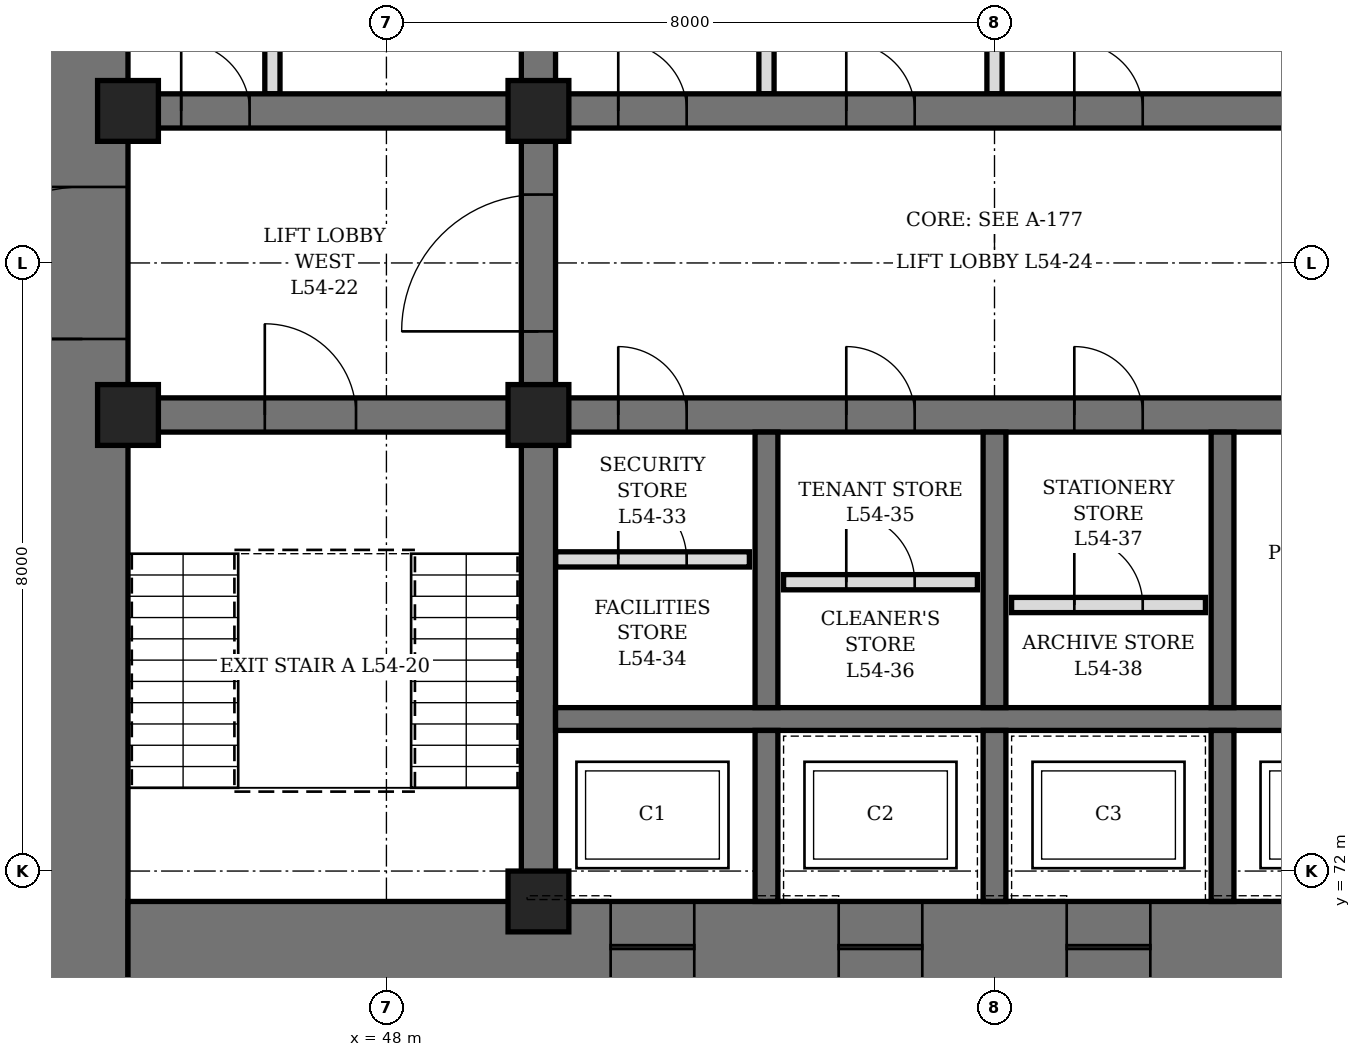
"""IFC4 building model, lengths in metres.
Left out: names, types, materials, properties, quantities, classifications, styles, units other than length and angle.
Written with IfcOpenShell. Run it as: python <this file> out.ifc"""

import sys

from ifc_helpers import new_model, si_unit, direction, frame, frame_2d, origin, origin_2d, place, context, subcontext, project, spatial, rectangle, hollow_rectangle, extrude, element, fill, save


model = new_model("IFC4")
c1 = context("Model", 3, precision=1e-05, world=origin(), true_north=direction((0.0, 1.0)))
c2 = subcontext(c1, "Body", "Model", "MODEL_VIEW")
j1 = project(units=[si_unit("LENGTHUNIT", "METRE"), si_unit("PLANEANGLEUNIT", "RADIAN")], contexts=[c1])
p1 = place(None, origin())
s1 = spatial("IfcSite", under=j1, at=p1, CompositionType="ELEMENT")
p2 = place(p1, origin())
s2 = spatial("IfcBuilding", under=s1, at=p2, CompositionType="ELEMENT")
p3 = place(p2, frame((0.0, 0.0, 240.1)))
s3 = spatial("IfcBuildingStorey", under=s2, at=p3, CompositionType="ELEMENT", Elevation=240.1)
p4 = place(p3, frame((44.0, 70.4, 0.0), z_axis=(0.0, 0.0, 1.0), x_axis=(0.0, 1.0, 0.0)))
e1 = element("IfcWall", 1, at=p4, inside=s3, PredefinedType="SHEAR", context=c2, shape_type="SweptSolid", body=[
    extrude(rectangle(XDim=19.2, YDim=1.2, at=frame_2d((9.6, 0.0))), origin(), (0.0, 0.0, 1.0), 4.2),
])
p5 = place(p4, frame((8.6, 0.0, 0.0)))
e2 = element("IfcOpeningElement", 2, at=p5, cuts=e1, PredefinedType="OPENING", context=c2, shape_type="SweptSolid", body=[
    extrude(rectangle(XDim=2.0, YDim=2.4, at=frame_2d((1.0, 1.2))), frame((0.0, 0.61, 0.0), z_axis=(0.0, -1.0, 0.0), x_axis=(1.0, 0.0, 0.0)), (0.0, 0.0, 1.0), 1.22),
])
p6 = place(p3, frame((44.6, 71.0, 0.0), z_axis=(0.0, 0.0, 1.0), x_axis=(1.0, 0.0, 0.0)))
e3 = element("IfcWall", 3, at=p6, inside=s3, PredefinedType="SHEAR", context=c2, shape_type="SweptSolid", body=[
    extrude(rectangle(XDim=22.8, YDim=1.2, at=frame_2d((11.4, 0.0))), origin(), (0.0, 0.0, 1.0), 4.2),
])
p7 = place(p6, frame((6.35, 0.0, 0.0)))
e4 = element("IfcOpeningElement", 4, at=p7, cuts=e3, PredefinedType="OPENING", context=c2, shape_type="SweptSolid", body=[
    extrude(rectangle(XDim=1.1, YDim=2.2, at=frame_2d((0.55, 1.1))), frame((0.0, 0.61, 0.0), z_axis=(0.0, -1.0, 0.0), x_axis=(1.0, 0.0, 0.0)), (0.0, 0.0, 1.0), 1.22),
])
p8 = place(p6, frame((9.35, 0.0, 0.0)))
e5 = element("IfcOpeningElement", 5, at=p8, cuts=e3, PredefinedType="OPENING", context=c2, shape_type="SweptSolid", body=[
    extrude(rectangle(XDim=1.1, YDim=2.2, at=frame_2d((0.55, 1.1))), frame((0.0, 0.61, 0.0), z_axis=(0.0, -1.0, 0.0), x_axis=(1.0, 0.0, 0.0)), (0.0, 0.0, 1.0), 1.22),
])
p9 = place(p6, frame((12.35, 0.0, 0.0)))
e6 = element("IfcOpeningElement", 6, at=p9, cuts=e3, PredefinedType="OPENING", context=c2, shape_type="SweptSolid", body=[
    extrude(rectangle(XDim=1.1, YDim=2.2, at=frame_2d((0.55, 1.1))), frame((0.0, 0.61, 0.0), z_axis=(0.0, -1.0, 0.0), x_axis=(1.0, 0.0, 0.0)), (0.0, 0.0, 1.0), 1.22),
])
p10 = place(p6, frame((15.35, 0.0, 0.0)))
e7 = element("IfcOpeningElement", 7, at=p10, cuts=e3, PredefinedType="OPENING", context=c2, shape_type="SweptSolid", body=[
    extrude(rectangle(XDim=1.1, YDim=2.2, at=frame_2d((0.55, 1.1))), frame((0.0, 0.61, 0.0), z_axis=(0.0, -1.0, 0.0), x_axis=(1.0, 0.0, 0.0)), (0.0, 0.0, 1.0), 1.22),
])
p11 = place(p3, frame((50.0, 71.6, 0.0), z_axis=(0.0, 0.0, 1.0), x_axis=(0.0, 1.0, 0.0)))
e8 = element("IfcWall", 8, at=p11, inside=s3, PredefinedType="SHEAR", context=c2, shape_type="SweptSolid", body=[
    extrude(rectangle(XDim=16.8, YDim=0.45, at=frame_2d((8.4, 0.0))), origin(), (0.0, 0.0, 1.0), 4.2),
])
p12 = place(p11, frame((7.5, 0.0, 0.0)))
e9 = element("IfcOpeningElement", 9, at=p12, cuts=e8, PredefinedType="OPENING", context=c2, shape_type="SweptSolid", body=[
    extrude(rectangle(XDim=1.8, YDim=2.4, at=frame_2d((0.9, 1.2))), frame((0.0, 0.235, 0.0), z_axis=(0.0, -1.0, 0.0), x_axis=(1.0, 0.0, 0.0)), (0.0, 0.0, 1.0), 0.47),
])
p13 = place(p3, frame((44.6, 78.0, 0.0), z_axis=(0.0, 0.0, 1.0), x_axis=(1.0, 0.0, 0.0)))
e10 = element("IfcWall", 10, at=p13, inside=s3, PredefinedType="SHEAR", context=c2, shape_type="SweptSolid", body=[
    extrude(rectangle(XDim=5.175, YDim=0.45, at=frame_2d((2.587, 0.0))), origin(), (0.0, 0.0, 1.0), 4.2),
])
p14 = place(p13, frame((1.8, 0.0, 0.0)))
e11 = element("IfcOpeningElement", 11, at=p14, cuts=e10, PredefinedType="OPENING", context=c2, shape_type="SweptSolid", body=[
    extrude(rectangle(XDim=1.2, YDim=2.1, at=frame_2d((0.6, 1.05))), frame((0.0, 0.235, 0.0), z_axis=(0.0, -1.0, 0.0), x_axis=(1.0, 0.0, 0.0)), (0.0, 0.0, 1.0), 0.47),
])
p15 = place(p3, frame((44.6, 82.0, 0.0), z_axis=(0.0, 0.0, 1.0), x_axis=(1.0, 0.0, 0.0)))
e12 = element("IfcWall", 12, at=p15, inside=s3, PredefinedType="SHEAR", context=c2, shape_type="SweptSolid", body=[
    extrude(rectangle(XDim=5.175, YDim=0.45, at=frame_2d((2.587, 0.0))), origin(), (0.0, 0.0, 1.0), 4.2),
])
p16 = place(p15, frame((0.7, 0.0, 0.0)))
e13 = element("IfcOpeningElement", 13, at=p16, cuts=e12, PredefinedType="OPENING", context=c2, shape_type="SweptSolid", body=[
    extrude(rectangle(XDim=0.9, YDim=2.1, at=frame_2d((0.45, 1.05))), frame((0.0, 0.235, 0.0), z_axis=(0.0, -1.0, 0.0), x_axis=(1.0, 0.0, 0.0)), (0.0, 0.0, 1.0), 0.47),
])
p17 = place(p3, frame((50.225, 78.0, 0.0), z_axis=(0.0, 0.0, 1.0), x_axis=(1.0, 0.0, 0.0)))
e14 = element("IfcWall", 14, at=p17, inside=s3, PredefinedType="SHEAR", context=c2, shape_type="SweptSolid", body=[
    extrude(rectangle(XDim=11.55, YDim=0.45, at=frame_2d((5.775, 0.0))), origin(), (0.0, 0.0, 1.0), 4.2),
])
p18 = place(p17, frame((0.825, 0.0, 0.0)))
e15 = element("IfcOpeningElement", 15, at=p18, cuts=e14, PredefinedType="OPENING", context=c2, shape_type="SweptSolid", body=[
    extrude(rectangle(XDim=0.9, YDim=2.1, at=frame_2d((0.45, 1.05))), frame((0.0, 0.235, 0.0), z_axis=(0.0, -1.0, 0.0), x_axis=(1.0, 0.0, 0.0)), (0.0, 0.0, 1.0), 0.47),
])
p19 = place(p17, frame((3.825, 0.0, 0.0)))
e16 = element("IfcOpeningElement", 16, at=p19, cuts=e14, PredefinedType="OPENING", context=c2, shape_type="SweptSolid", body=[
    extrude(rectangle(XDim=0.9, YDim=2.1, at=frame_2d((0.45, 1.05))), frame((0.0, 0.235, 0.0), z_axis=(0.0, -1.0, 0.0), x_axis=(1.0, 0.0, 0.0)), (0.0, 0.0, 1.0), 0.47),
])
p20 = place(p17, frame((6.825, 0.0, 0.0)))
e17 = element("IfcOpeningElement", 17, at=p20, cuts=e14, PredefinedType="OPENING", context=c2, shape_type="SweptSolid", body=[
    extrude(rectangle(XDim=0.9, YDim=2.1, at=frame_2d((0.45, 1.05))), frame((0.0, 0.235, 0.0), z_axis=(0.0, -1.0, 0.0), x_axis=(1.0, 0.0, 0.0)), (0.0, 0.0, 1.0), 0.47),
])
p21 = place(p17, frame((9.825, 0.0, 0.0)))
e18 = element("IfcOpeningElement", 18, at=p21, cuts=e14, PredefinedType="OPENING", context=c2, shape_type="SweptSolid", body=[
    extrude(rectangle(XDim=0.9, YDim=2.1, at=frame_2d((0.45, 1.05))), frame((0.0, 0.235, 0.0), z_axis=(0.0, -1.0, 0.0), x_axis=(1.0, 0.0, 0.0)), (0.0, 0.0, 1.0), 0.47),
])
p22 = place(p3, frame((50.225, 82.0, 0.0), z_axis=(0.0, 0.0, 1.0), x_axis=(1.0, 0.0, 0.0)))
e19 = element("IfcWall", 19, at=p22, inside=s3, PredefinedType="SHEAR", context=c2, shape_type="SweptSolid", body=[
    extrude(rectangle(XDim=11.55, YDim=0.45, at=frame_2d((5.775, 0.0))), origin(), (0.0, 0.0, 1.0), 4.2),
])
p23 = place(p22, frame((0.825, 0.0, 0.0)))
e20 = element("IfcOpeningElement", 20, at=p23, cuts=e19, PredefinedType="OPENING", context=c2, shape_type="SweptSolid", body=[
    extrude(rectangle(XDim=0.9, YDim=2.1, at=frame_2d((0.45, 1.05))), frame((0.0, 0.235, 0.0), z_axis=(0.0, -1.0, 0.0), x_axis=(1.0, 0.0, 0.0)), (0.0, 0.0, 1.0), 0.47),
])
p24 = place(p22, frame((3.825, 0.0, 0.0)))
e21 = element("IfcOpeningElement", 21, at=p24, cuts=e19, PredefinedType="OPENING", context=c2, shape_type="SweptSolid", body=[
    extrude(rectangle(XDim=0.9, YDim=2.1, at=frame_2d((0.45, 1.05))), frame((0.0, 0.235, 0.0), z_axis=(0.0, -1.0, 0.0), x_axis=(1.0, 0.0, 0.0)), (0.0, 0.0, 1.0), 0.47),
])
p25 = place(p22, frame((6.825, 0.0, 0.0)))
e22 = element("IfcOpeningElement", 22, at=p25, cuts=e19, PredefinedType="OPENING", context=c2, shape_type="SweptSolid", body=[
    extrude(rectangle(XDim=0.9, YDim=2.1, at=frame_2d((0.45, 1.05))), frame((0.0, 0.235, 0.0), z_axis=(0.0, -1.0, 0.0), x_axis=(1.0, 0.0, 0.0)), (0.0, 0.0, 1.0), 0.47),
])
p26 = place(p22, frame((9.825, 0.0, 0.0)))
e23 = element("IfcOpeningElement", 23, at=p26, cuts=e19, PredefinedType="OPENING", context=c2, shape_type="SweptSolid", body=[
    extrude(rectangle(XDim=0.9, YDim=2.1, at=frame_2d((0.45, 1.05))), frame((0.0, 0.235, 0.0), z_axis=(0.0, -1.0, 0.0), x_axis=(1.0, 0.0, 0.0)), (0.0, 0.0, 1.0), 0.47),
])
p27 = place(p3, frame((50.225, 74.0, 0.0), z_axis=(0.0, 0.0, 1.0), x_axis=(1.0, 0.0, 0.0)))
e24 = element("IfcWall", 24, at=p27, inside=s3, PredefinedType="SHEAR", context=c2, shape_type="SweptSolid", body=[
    extrude(rectangle(XDim=11.55, YDim=0.3, at=frame_2d((5.775, 0.0))), origin(), (0.0, 0.0, 1.0), 4.2),
])
p28 = place(p3, frame((53.0, 71.6, 0.0), z_axis=(0.0, 0.0, 1.0), x_axis=(0.0, 1.0, 0.0)))
e25 = element("IfcWall", 25, at=p28, inside=s3, PredefinedType="SHEAR", context=c2, shape_type="SweptSolid", body=[
    extrude(rectangle(XDim=2.25, YDim=0.3, at=frame_2d((1.125, 0.0))), origin(), (0.0, 0.0, 1.0), 4.2),
])
p29 = place(p3, frame((53.0, 74.15, 0.0), z_axis=(0.0, 0.0, 1.0), x_axis=(0.0, 1.0, 0.0)))
e26 = element("IfcWall", 26, at=p29, inside=s3, PredefinedType="SHEAR", context=c2, shape_type="SweptSolid", body=[
    extrude(rectangle(XDim=3.625, YDim=0.3, at=frame_2d((1.812, 0.0))), origin(), (0.0, 0.0, 1.0), 4.2),
])
p30 = place(p3, frame((56.0, 71.6, 0.0), z_axis=(0.0, 0.0, 1.0), x_axis=(0.0, 1.0, 0.0)))
e27 = element("IfcWall", 27, at=p30, inside=s3, PredefinedType="SHEAR", context=c2, shape_type="SweptSolid", body=[
    extrude(rectangle(XDim=2.25, YDim=0.3, at=frame_2d((1.125, 0.0))), origin(), (0.0, 0.0, 1.0), 4.2),
])
p31 = place(p3, frame((56.0, 74.15, 0.0), z_axis=(0.0, 0.0, 1.0), x_axis=(0.0, 1.0, 0.0)))
e28 = element("IfcWall", 28, at=p31, inside=s3, PredefinedType="SHEAR", context=c2, shape_type="SweptSolid", body=[
    extrude(rectangle(XDim=3.625, YDim=0.3, at=frame_2d((1.812, 0.0))), origin(), (0.0, 0.0, 1.0), 4.2),
])
p32 = place(p3, frame((59.0, 71.6, 0.0), z_axis=(0.0, 0.0, 1.0), x_axis=(0.0, 1.0, 0.0)))
e29 = element("IfcWall", 29, at=p32, inside=s3, PredefinedType="SHEAR", context=c2, shape_type="SweptSolid", body=[
    extrude(rectangle(XDim=2.25, YDim=0.3, at=frame_2d((1.125, 0.0))), origin(), (0.0, 0.0, 1.0), 4.2),
])
p33 = place(p3, frame((59.0, 74.15, 0.0), z_axis=(0.0, 0.0, 1.0), x_axis=(0.0, 1.0, 0.0)))
e30 = element("IfcWall", 30, at=p33, inside=s3, PredefinedType="SHEAR", context=c2, shape_type="SweptSolid", body=[
    extrude(rectangle(XDim=3.625, YDim=0.3, at=frame_2d((1.812, 0.0))), origin(), (0.0, 0.0, 1.0), 4.2),
])
for number, where, z_axis, x_axis in (
    (31, (44.6, 78.0, 0.0), (0.0, 0.0, 1.0), (1.0, 0.0, 0.0)),
    (32, (44.6, 82.0, 0.0), (0.0, 0.0, 1.0), (1.0, 0.0, 0.0)),
    (33, (50.0, 71.6, 0.0), (0.0, 0.0, 1.0), (1.0, 0.0, 0.0)),
    (34, (50.0, 78.0, 0.0), (0.0, 0.0, 1.0), (1.0, 0.0, 0.0)),
    (35, (50.0, 82.0, 0.0), (0.0, 0.0, 1.0), (1.0, 0.0, 0.0)),
):
    element("IfcColumn", number, at=place(p3, frame(where, z_axis=z_axis, x_axis=x_axis)), inside=s3, PredefinedType="COLUMN", context=c2, shape_type="SweptSolid", body=[
        extrude(hollow_rectangle(XDim=0.8, YDim=0.8, WallThickness=0.1, at=origin_2d()), origin(), (0.0, 0.0, 1.0), 4.2),
    ])
p34 = place(p3, frame((46.5, 82.225, 0.0), z_axis=(0.0, 0.0, 1.0), x_axis=(0.0, 1.0, 0.0)))
e36 = element("IfcWall", 36, at=p34, inside=s3, PredefinedType="PARTITIONING", context=c2, shape_type="SweptSolid", body=[
    extrude(rectangle(XDim=3.05, YDim=0.2, at=frame_2d((1.525, 0.0))), origin(), (0.0, 0.0, 1.0), 3.95),
])
p35 = place(p34, frame((1.075, 0.0, 0.0)))
e37 = element("IfcOpeningElement", 37, at=p35, cuts=e36, PredefinedType="OPENING", context=c2, shape_type="SweptSolid", body=[
    extrude(rectangle(XDim=0.9, YDim=2.1, at=frame_2d((0.45, 1.05))), frame((0.0, 0.11, 0.0), z_axis=(0.0, -1.0, 0.0), x_axis=(1.0, 0.0, 0.0)), (0.0, 0.0, 1.0), 0.22),
])
p36 = place(p3, frame((50.225, 76.1, 0.0), z_axis=(0.0, 0.0, 1.0), x_axis=(1.0, 0.0, 0.0)))
e38 = element("IfcWall", 38, at=p36, inside=s3, PredefinedType="PARTITIONING", context=c2, shape_type="SweptSolid", body=[
    extrude(rectangle(XDim=2.55, YDim=0.2, at=frame_2d((1.275, 0.0))), origin(), (0.0, 0.0, 1.0), 3.95),
])
p37 = place(p36, frame((0.825, 0.0, 0.0)))
e39 = element("IfcOpeningElement", 39, at=p37, cuts=e38, PredefinedType="OPENING", context=c2, shape_type="SweptSolid", body=[
    extrude(rectangle(XDim=0.9, YDim=2.1, at=frame_2d((0.45, 1.05))), frame((0.0, 0.11, 0.0), z_axis=(0.0, -1.0, 0.0), x_axis=(1.0, 0.0, 0.0)), (0.0, 0.0, 1.0), 0.22),
])
p38 = place(p3, frame((53.225, 75.8, 0.0), z_axis=(0.0, 0.0, 1.0), x_axis=(1.0, 0.0, 0.0)))
e40 = element("IfcWall", 40, at=p38, inside=s3, PredefinedType="PARTITIONING", context=c2, shape_type="SweptSolid", body=[
    extrude(rectangle(XDim=2.55, YDim=0.2, at=frame_2d((1.275, 0.0))), origin(), (0.0, 0.0, 1.0), 3.95),
])
p39 = place(p38, frame((0.825, 0.0, 0.0)))
e41 = element("IfcOpeningElement", 41, at=p39, cuts=e40, PredefinedType="OPENING", context=c2, shape_type="SweptSolid", body=[
    extrude(rectangle(XDim=0.9, YDim=2.1, at=frame_2d((0.45, 1.05))), frame((0.0, 0.11, 0.0), z_axis=(0.0, -1.0, 0.0), x_axis=(1.0, 0.0, 0.0)), (0.0, 0.0, 1.0), 0.22),
])
p40 = place(p3, frame((56.225, 75.5, 0.0), z_axis=(0.0, 0.0, 1.0), x_axis=(1.0, 0.0, 0.0)))
e42 = element("IfcWall", 42, at=p40, inside=s3, PredefinedType="PARTITIONING", context=c2, shape_type="SweptSolid", body=[
    extrude(rectangle(XDim=2.55, YDim=0.2, at=frame_2d((1.275, 0.0))), origin(), (0.0, 0.0, 1.0), 3.95),
])
p41 = place(p40, frame((0.825, 0.0, 0.0)))
e43 = element("IfcOpeningElement", 43, at=p41, cuts=e42, PredefinedType="OPENING", context=c2, shape_type="SweptSolid", body=[
    extrude(rectangle(XDim=0.9, YDim=2.1, at=frame_2d((0.45, 1.05))), frame((0.0, 0.11, 0.0), z_axis=(0.0, -1.0, 0.0), x_axis=(1.0, 0.0, 0.0)), (0.0, 0.0, 1.0), 0.22),
])
p42 = place(p3, frame((53.0, 82.225, 0.0), z_axis=(0.0, 0.0, 1.0), x_axis=(0.0, 1.0, 0.0)))
e44 = element("IfcWall", 44, at=p42, inside=s3, PredefinedType="PARTITIONING", context=c2, shape_type="SweptSolid", body=[
    extrude(rectangle(XDim=3.55, YDim=0.2, at=frame_2d((1.775, 0.0))), origin(), (0.0, 0.0, 1.0), 3.95),
])
p43 = place(p3, frame((56.0, 82.225, 0.0), z_axis=(0.0, 0.0, 1.0), x_axis=(0.0, 1.0, 0.0)))
e45 = element("IfcWall", 45, at=p43, inside=s3, PredefinedType="PARTITIONING", context=c2, shape_type="SweptSolid", body=[
    extrude(rectangle(XDim=3.55, YDim=0.2, at=frame_2d((1.775, 0.0))), origin(), (0.0, 0.0, 1.0), 3.05),
])
p44 = place(p16, origin())
e46 = element("IfcDoor", 46, at=p44, inside=s3, OperationType="SINGLE_SWING_LEFT", PredefinedType="DOOR", context=c2, shape_type="SweptSolid", body=[
    extrude(rectangle(XDim=0.9, YDim=2.1, at=frame_2d((0.45, 1.05))), frame((0.0, 0.225, 0.0), z_axis=(0.0, -1.0, 0.0), x_axis=(1.0, 0.0, 0.0)), (0.0, 0.0, 1.0), 0.449),
])
fill(e13, e46)
p45 = place(p18, origin())
e47 = element("IfcDoor", 47, at=p45, inside=s3, OperationType="SINGLE_SWING_LEFT", PredefinedType="DOOR", context=c2, shape_type="SweptSolid", body=[
    extrude(rectangle(XDim=0.9, YDim=2.1, at=frame_2d((0.45, 1.05))), frame((0.0, 0.225, 0.0), z_axis=(0.0, -1.0, 0.0), x_axis=(1.0, 0.0, 0.0)), (0.0, 0.0, 1.0), 0.449),
])
fill(e15, e47)
p46 = place(p37, origin())
e48 = element("IfcDoor", 48, at=p46, inside=s3, OperationType="SINGLE_SWING_LEFT", PredefinedType="DOOR", context=c2, shape_type="SweptSolid", body=[
    extrude(rectangle(XDim=0.9, YDim=2.1, at=frame_2d((0.45, 1.05))), frame((0.0, 0.1, 0.0), z_axis=(0.0, -1.0, 0.0), x_axis=(1.0, 0.0, 0.0)), (0.0, 0.0, 1.0), 0.199),
])
fill(e39, e48)
p47 = place(p19, origin())
e49 = element("IfcDoor", 49, at=p47, inside=s3, OperationType="SINGLE_SWING_LEFT", PredefinedType="DOOR", context=c2, shape_type="SweptSolid", body=[
    extrude(rectangle(XDim=0.9, YDim=2.1, at=frame_2d((0.45, 1.05))), frame((0.0, 0.225, 0.0), z_axis=(0.0, -1.0, 0.0), x_axis=(1.0, 0.0, 0.0)), (0.0, 0.0, 1.0), 0.449),
])
fill(e16, e49)
p48 = place(p39, origin())
e50 = element("IfcDoor", 50, at=p48, inside=s3, OperationType="SINGLE_SWING_LEFT", PredefinedType="DOOR", context=c2, shape_type="SweptSolid", body=[
    extrude(rectangle(XDim=0.9, YDim=2.1, at=frame_2d((0.45, 1.05))), frame((0.0, 0.1, 0.0), z_axis=(0.0, -1.0, 0.0), x_axis=(1.0, 0.0, 0.0)), (0.0, 0.0, 1.0), 0.199),
])
fill(e41, e50)
p49 = place(p20, origin())
e51 = element("IfcDoor", 51, at=p49, inside=s3, OperationType="SINGLE_SWING_LEFT", PredefinedType="DOOR", context=c2, shape_type="SweptSolid", body=[
    extrude(rectangle(XDim=0.9, YDim=2.1, at=frame_2d((0.45, 1.05))), frame((0.0, 0.225, 0.0), z_axis=(0.0, -1.0, 0.0), x_axis=(1.0, 0.0, 0.0)), (0.0, 0.0, 1.0), 0.449),
])
fill(e17, e51)
p50 = place(p41, origin())
e52 = element("IfcDoor", 52, at=p50, inside=s3, OperationType="SINGLE_SWING_LEFT", PredefinedType="DOOR", context=c2, shape_type="SweptSolid", body=[
    extrude(rectangle(XDim=0.9, YDim=2.1, at=frame_2d((0.45, 1.05))), frame((0.0, 0.1, 0.0), z_axis=(0.0, -1.0, 0.0), x_axis=(1.0, 0.0, 0.0)), (0.0, 0.0, 1.0), 0.199),
])
fill(e43, e52)
p51 = place(p23, origin())
e53 = element("IfcDoor", 53, at=p51, inside=s3, OperationType="SINGLE_SWING_LEFT", PredefinedType="DOOR", context=c2, shape_type="SweptSolid", body=[
    extrude(rectangle(XDim=0.9, YDim=2.1, at=frame_2d((0.45, 1.05))), frame((0.0, 0.225, 0.0), z_axis=(0.0, -1.0, 0.0), x_axis=(1.0, 0.0, 0.0)), (0.0, 0.0, 1.0), 0.449),
])
fill(e20, e53)
p52 = place(p24, origin())
e54 = element("IfcDoor", 54, at=p52, inside=s3, OperationType="SINGLE_SWING_LEFT", PredefinedType="DOOR", context=c2, shape_type="SweptSolid", body=[
    extrude(rectangle(XDim=0.9, YDim=2.1, at=frame_2d((0.45, 1.05))), frame((0.0, 0.225, 0.0), z_axis=(0.0, -1.0, 0.0), x_axis=(1.0, 0.0, 0.0)), (0.0, 0.0, 1.0), 0.449),
])
fill(e21, e54)
p53 = place(p25, origin())
e55 = element("IfcDoor", 55, at=p53, inside=s3, OperationType="SINGLE_SWING_LEFT", PredefinedType="DOOR", context=c2, shape_type="SweptSolid", body=[
    extrude(rectangle(XDim=0.9, YDim=2.1, at=frame_2d((0.45, 1.05))), frame((0.0, 0.225, 0.0), z_axis=(0.0, -1.0, 0.0), x_axis=(1.0, 0.0, 0.0)), (0.0, 0.0, 1.0), 0.449),
])
fill(e22, e55)
p54 = place(p14, origin())
e56 = element("IfcDoor", 56, at=p54, inside=s3, OperationType="SINGLE_SWING_LEFT", PredefinedType="DOOR", context=c2, shape_type="SweptSolid", body=[
    extrude(rectangle(XDim=1.2, YDim=2.1, at=frame_2d((0.6, 1.05))), frame((0.0, 0.225, 0.0), z_axis=(0.0, -1.0, 0.0), x_axis=(1.0, 0.0, 0.0)), (0.0, 0.0, 1.0), 0.449),
])
fill(e11, e56)
p55 = place(p5, origin())
e57 = element("IfcDoor", 57, at=p55, inside=s3, OperationType="DOUBLE_DOOR_SINGLE_SWING", PredefinedType="DOOR", context=c2, shape_type="SweptSolid", body=[
    extrude(rectangle(XDim=2.0, YDim=2.4, at=frame_2d((1.0, 1.2))), frame((0.0, 0.35, 0.0), z_axis=(0.0, -1.0, 0.0), x_axis=(1.0, 0.0, 0.0)), (0.0, 0.0, 1.0), 0.7),
])
fill(e2, e57)
p56 = place(p12, origin())
e58 = element("IfcDoor", 58, at=p56, inside=s3, OperationType="DOUBLE_DOOR_SINGLE_SWING", PredefinedType="DOOR", context=c2, shape_type="SweptSolid", body=[
    extrude(rectangle(XDim=1.8, YDim=2.4, at=frame_2d((0.9, 1.2))), frame((0.0, 0.225, 0.0), z_axis=(0.0, -1.0, 0.0), x_axis=(1.0, 0.0, 0.0)), (0.0, 0.0, 1.0), 0.449),
])
fill(e9, e58)
p57 = place(p7, origin())
e59 = element("IfcDoor", 59, at=p57, inside=s3, OperationType="SLIDING_TO_LEFT", PredefinedType="DOOR", context=c2, shape_type="SweptSolid", body=[
    extrude(rectangle(XDim=1.1, YDim=2.2, at=frame_2d((0.55, 1.1))), frame((0.0, 0.35, 0.0), z_axis=(0.0, -1.0, 0.0), x_axis=(1.0, 0.0, 0.0)), (0.0, 0.0, 1.0), 0.7),
])
fill(e4, e59)
p58 = place(p8, origin())
e60 = element("IfcDoor", 60, at=p58, inside=s3, OperationType="SLIDING_TO_LEFT", PredefinedType="DOOR", context=c2, shape_type="SweptSolid", body=[
    extrude(rectangle(XDim=1.1, YDim=2.2, at=frame_2d((0.55, 1.1))), frame((0.0, 0.35, 0.0), z_axis=(0.0, -1.0, 0.0), x_axis=(1.0, 0.0, 0.0)), (0.0, 0.0, 1.0), 0.7),
])
fill(e5, e60)
p59 = place(p9, origin())
e61 = element("IfcDoor", 61, at=p59, inside=s3, OperationType="SLIDING_TO_LEFT", PredefinedType="DOOR", context=c2, shape_type="SweptSolid", body=[
    extrude(rectangle(XDim=1.1, YDim=2.2, at=frame_2d((0.55, 1.1))), frame((0.0, 0.35, 0.0), z_axis=(0.0, -1.0, 0.0), x_axis=(1.0, 0.0, 0.0)), (0.0, 0.0, 1.0), 0.7),
])
fill(e6, e61)
save(model, sys.argv[1])
